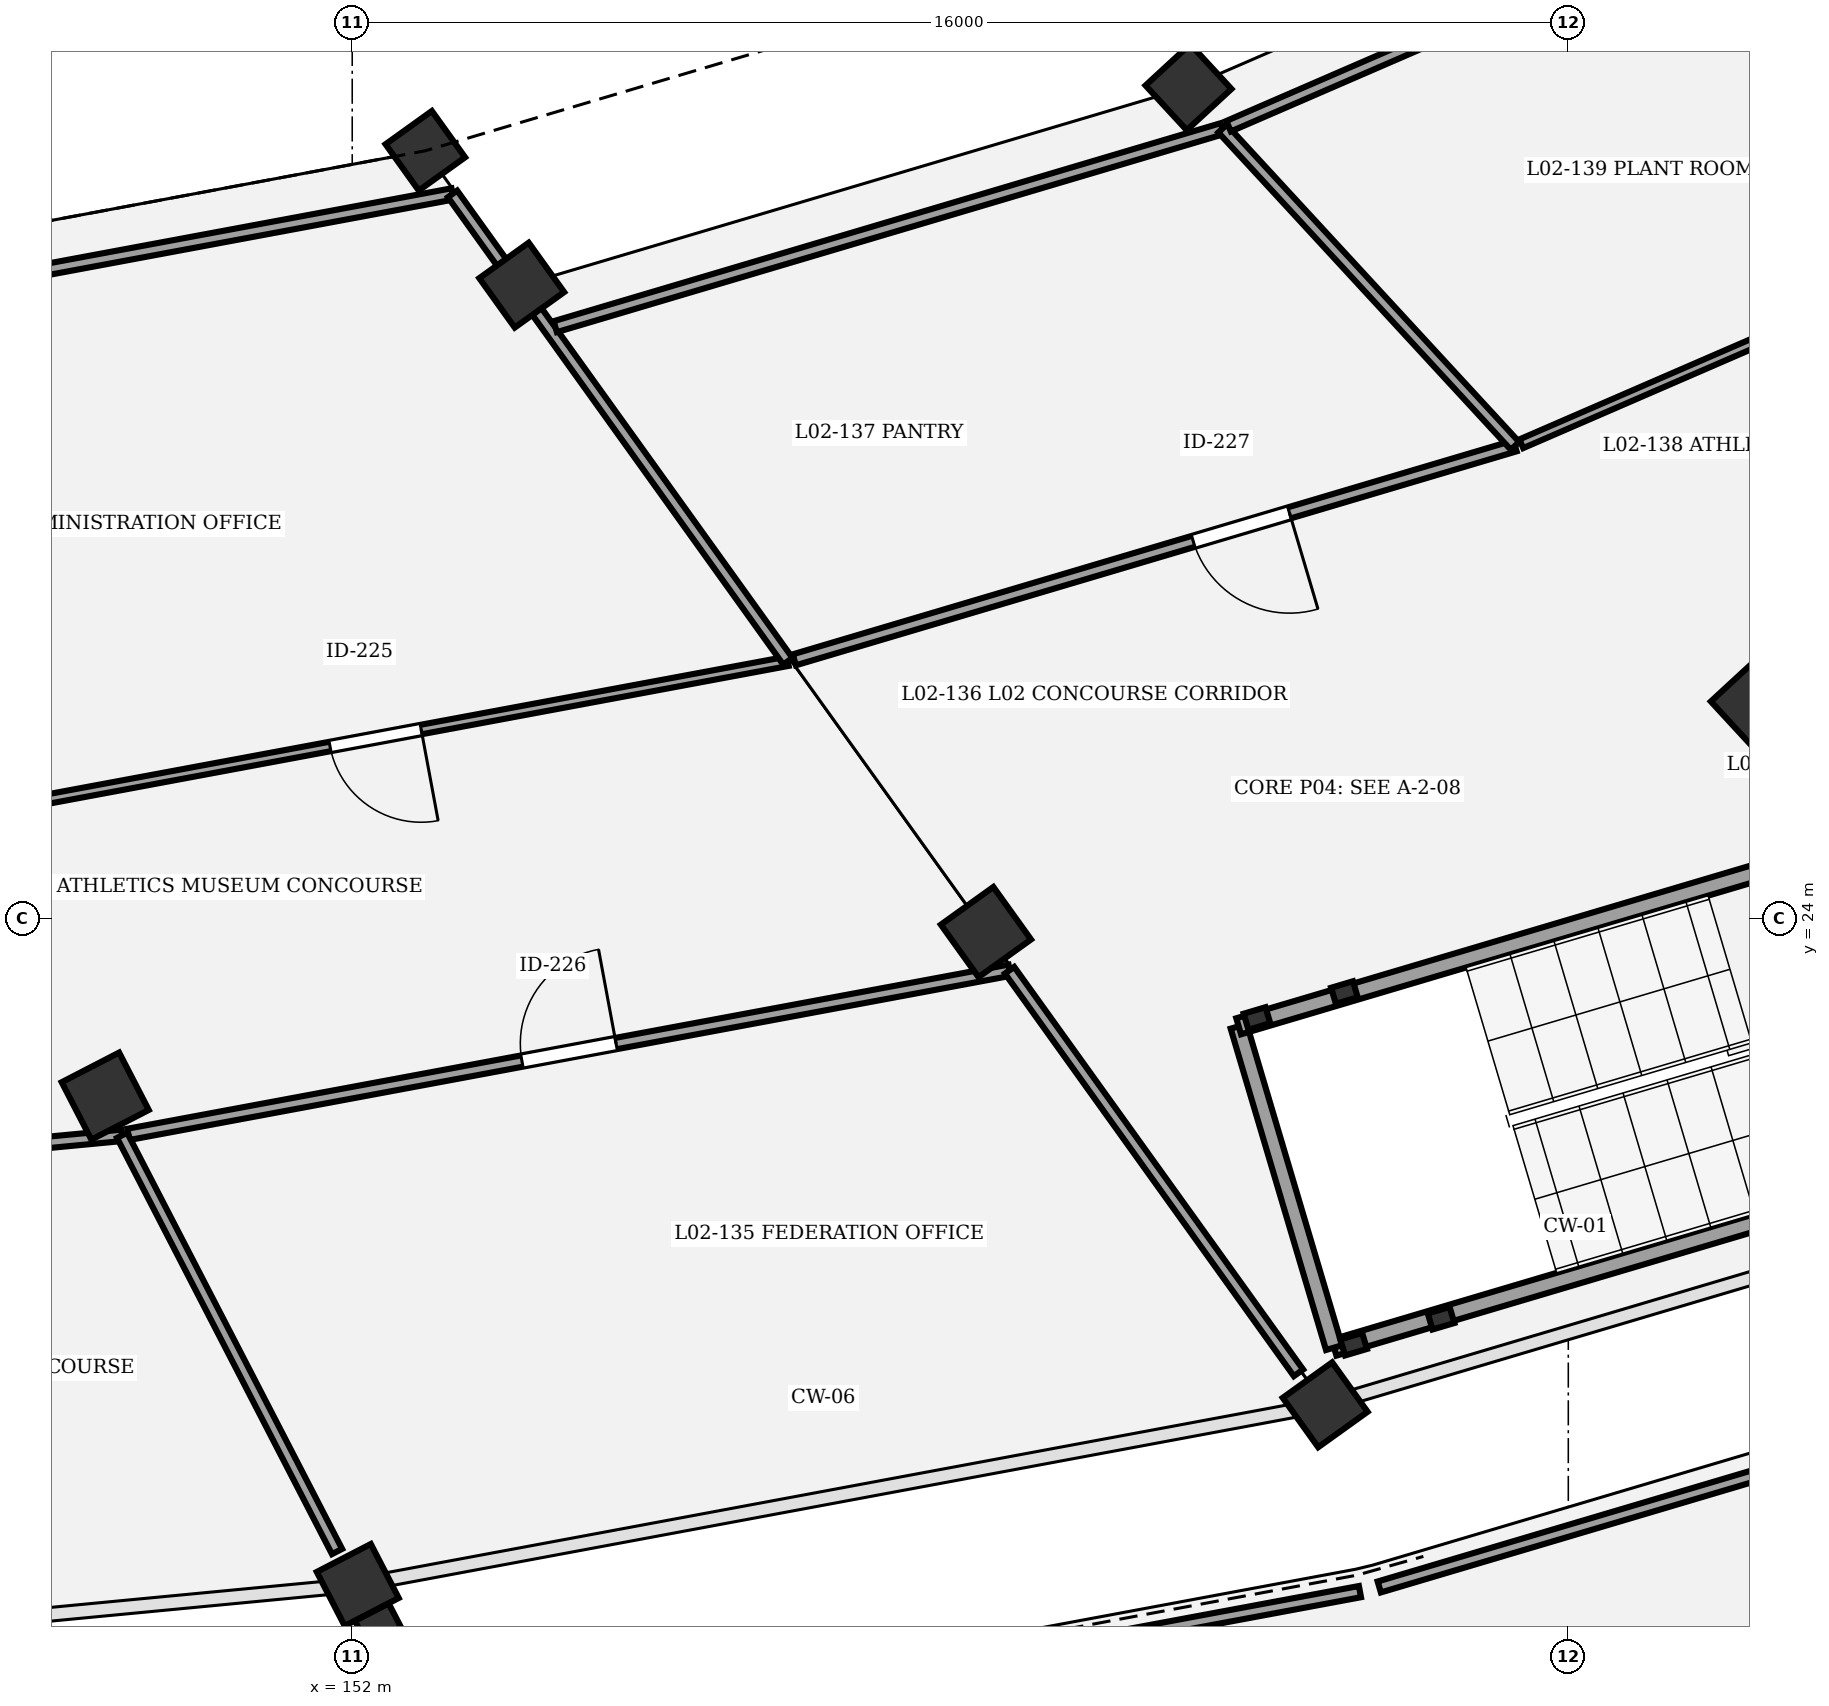
"""IFC4 building model, lengths in metres.
Left out: names, types, materials, properties, quantities, classifications, styles, units other than length and angle.
Written with IfcOpenShell. Run it as: python <this file> out.ifc"""

import sys

from ifc_helpers import new_model, si_unit, direction, frame, frame_2d, origin, origin_2d, place, context, subcontext, project, spatial, rectangle, extrude, element, fill, save


model = new_model("IFC4")
c1 = context("Model", 3, precision=1e-05, world=origin(), true_north=direction((0.0, 1.0)))
c2 = subcontext(c1, "Body", "Model", "MODEL_VIEW")
j1 = project(units=[si_unit("LENGTHUNIT", "METRE"), si_unit("PLANEANGLEUNIT", "RADIAN")], contexts=[c1])
p1 = place(None, origin())
s1 = spatial("IfcSite", under=j1, at=p1, CompositionType="ELEMENT")
p2 = place(p1, origin())
s2 = spatial("IfcBuilding", under=s1, at=p2, CompositionType="ELEMENT")
p3 = place(p2, frame((0.0, 0.0, 10.2)))
s3 = spatial("IfcBuildingStorey", under=s2, at=p3, CompositionType="ELEMENT", Elevation=10.2)
p4 = place(p3, frame((148.75, 21.665, 0.0), z_axis=(0.0, 0.0, 1.0), x_axis=(0.458959712465, -0.888457079624, 0.0)))
e1 = element("IfcColumn", 1, at=p4, inside=s3, PredefinedType="COLUMN", context=c2, shape_type="SweptSolid", body=[
    extrude(rectangle(XDim=0.85, YDim=0.85, at=origin_2d()), origin(), (0.0, 0.0, 1.0), 4.5),
])
p5 = place(p3, frame((152.073, 15.233, 0.0), z_axis=(0.0, 0.0, 1.0), x_axis=(0.458959712465, -0.888457079624, 0.0)))
e2 = element("IfcColumn", 2, at=p5, inside=s3, PredefinedType="COLUMN", context=c2, shape_type="SweptSolid", body=[
    extrude(rectangle(XDim=0.8, YDim=0.8, at=origin_2d()), origin(), (0.0, 0.0, 1.0), 4.5),
])
p6 = place(p3, frame((152.338, 14.719, 0.0), z_axis=(0.0, 0.0, 1.0), x_axis=(0.888457079624, 0.458959712465, 0.0)))
e3 = element("IfcColumn", 3, at=p6, inside=s3, PredefinedType="PILASTER", context=c2, shape_type="SweptSolid", body=[
    extrude(rectangle(XDim=0.5, YDim=0.35, at=origin_2d()), origin(), (0.0, 0.0, 1.0), 4.5),
])
p7 = place(p3, frame((152.962, 34.101, 0.0), z_axis=(0.0, 0.0, 1.0), x_axis=(0.582974127943, -0.812490717577, 0.0)))
e4 = element("IfcColumn", 4, at=p7, inside=s3, PredefinedType="COLUMN", context=c2, shape_type="SweptSolid", body=[
    extrude(rectangle(XDim=0.75, YDim=0.75, at=origin_2d()), origin(), (0.0, 0.0, 1.0), 4.5),
])
p8 = place(p3, frame((154.23, 32.333, 0.0), z_axis=(0.0, 0.0, 1.0), x_axis=(0.582974127943, -0.812490717577, 0.0)))
e5 = element("IfcColumn", 5, at=p8, inside=s3, PredefinedType="COLUMN", context=c2, shape_type="SweptSolid", body=[
    extrude(rectangle(XDim=0.8, YDim=0.8, at=origin_2d()), origin(), (0.0, 0.0, 1.0), 4.5),
])
p9 = place(p3, frame((160.338, 23.823, 0.0), z_axis=(0.0, 0.0, 1.0), x_axis=(0.582974127943, -0.812490717577, 0.0)))
e6 = element("IfcColumn", 6, at=p9, inside=s3, PredefinedType="COLUMN", context=c2, shape_type="SweptSolid", body=[
    extrude(rectangle(XDim=0.85, YDim=0.85, at=origin_2d()), origin(), (0.0, 0.0, 1.0), 4.5),
])
for number, where, z_axis, x_axis in (
    (7, (164.801, 17.603, 0.0), (0.0, 0.0, 1.0), (0.583, -0.812, 0.0)),
    (8, (163.003, 34.938, 0.0), (0.0, 0.0, 1.0), (0.678, -0.735, 0.0)),
):
    element("IfcColumn", number, at=place(p3, frame(where, z_axis=z_axis, x_axis=x_axis)), inside=s3, PredefinedType="COLUMN", context=c2, shape_type="SweptSolid", body=[
        extrude(rectangle(XDim=0.8, YDim=0.8, at=origin_2d()), origin(), (0.0, 0.0, 1.0), 4.5),
    ])
p10 = place(p3, frame((170.476, 26.832, 0.0), z_axis=(0.0, 0.0, 1.0), x_axis=(0.677903094969, -0.735151272753, 0.0)))
e9 = element("IfcColumn", 9, at=p10, inside=s3, PredefinedType="COLUMN", context=c2, shape_type="SweptSolid", body=[
    extrude(rectangle(XDim=0.85, YDim=0.85, at=origin_2d()), origin(), (0.0, 0.0, 1.0), 4.5),
])
for number, where, z_axis, x_axis in (
    (10, (165.054, 23.027, 0.0), (0.0, 0.0, 1.0), (-0.959, -0.285, 0.0)),
    (11, (163.904, 22.686, 0.0), (0.0, 0.0, 1.0), (-0.959, -0.285, 0.0)),
    (12, (165.176, 18.4, 0.0), (0.0, 0.0, 1.0), (-0.959, -0.285, 0.0)),
    (13, (166.326, 18.742, 0.0), (0.0, 0.0, 1.0), (-0.959, -0.285, 0.0)),
):
    element("IfcColumn", number, at=place(p3, frame(where, z_axis=z_axis, x_axis=x_axis)), inside=s3, PredefinedType="COLUMN", context=c2, shape_type="SweptSolid", body=[
        extrude(rectangle(XDim=0.3, YDim=0.22, at=origin_2d()), origin(), (0.0, 0.0, 1.0), 4.5),
    ])
p11 = place(p3, frame((173.105, 20.785, 0.0), z_axis=(0.0, 0.0, 1.0), x_axis=(-0.958675743706, -0.284500998997, 0.0)))
e14 = element("IfcWall", 14, at=p11, inside=s3, PredefinedType="SHEAR", context=c2, shape_type="SweptSolid", body=[
    extrude(rectangle(XDim=8.54, YDim=0.22, at=frame_2d((4.27, 0.0))), origin(), (0.0, 0.0, 1.0), 4.25),
])
p12 = place(p3, frame((163.663, 22.583, 0.0), z_axis=(0.0, 0.0, 1.0), x_axis=(0.284497328872, -0.958676832861, 0.0)))
e15 = element("IfcWall", 15, at=p12, inside=s3, PredefinedType="SHEAR", context=c2, shape_type="SweptSolid", body=[
    extrude(rectangle(XDim=4.41, YDim=0.22, at=frame_2d((2.205, 0.0))), origin(), (0.0, 0.0, 1.0), 4.25),
])
p13 = place(p3, frame((171.85, 25.013, 0.0), z_axis=(0.0, 0.0, 1.0), x_axis=(-0.95867342973, -0.284508796227, 0.0)))
e16 = element("IfcWall", 16, at=p13, inside=s3, PredefinedType="SHEAR", context=c2, shape_type="SweptSolid", body=[
    extrude(rectangle(XDim=8.54, YDim=0.22, at=frame_2d((4.27, 0.0))), origin(), (0.0, 0.0, 1.0), 4.25),
])
p14 = place(p13, frame((0.3, 0.0, 0.0)))
e17 = element("IfcOpeningElement", 17, at=p14, cuts=e16, PredefinedType="OPENING", context=c2, shape_type="SweptSolid", body=[
    extrude(rectangle(XDim=1.15, YDim=2.15, at=frame_2d((0.575, 1.075))), frame((0.0, 0.12, 0.0), z_axis=(0.0, -1.0, 0.0), x_axis=(1.0, 0.0, 0.0)), (0.0, 0.0, 1.0), 0.24),
])
p15 = place(p3, frame((135.681, 19.881, 0.0), z_axis=(0.0, 0.0, 1.0), x_axis=(0.995484535327, 0.094923863827, 0.0)))
e18 = element("IfcWall", 18, at=p15, inside=s3, PredefinedType="PARTITIONING", context=c2, shape_type="SweptSolid", body=[
    extrude(rectangle(XDim=13.351, YDim=0.15, at=frame_2d((6.676, 0.0))), origin(), (0.0, 0.0, 1.0), 3.25),
])
p16 = place(p15, frame((6.085, 0.0, 0.0)))
e19 = element("IfcOpeningElement", 19, at=p16, cuts=e18, PredefinedType="OPENING", context=c2, shape_type="SweptSolid", body=[
    extrude(rectangle(XDim=1.18, YDim=2.1, at=frame_2d((0.59, 1.05))), frame((0.0, 0.085, 0.0), z_axis=(0.0, -1.0, 0.0), x_axis=(1.0, 0.0, 0.0)), (0.0, 0.0, 1.0), 0.17),
])
p17 = place(p3, frame((157.732, 27.386, 0.0), z_axis=(0.0, 0.0, 1.0), x_axis=(-0.983097372707, -0.183083466695, 0.0)))
e20 = element("IfcWall", 20, at=p17, inside=s3, PredefinedType="PARTITIONING", context=c2, shape_type="SweptSolid", body=[
    extrude(rectangle(XDim=11.035, YDim=0.125, at=frame_2d((5.517, 0.0))), origin(), (0.0, 0.0, 1.0), 3.25),
])
p18 = place(p17, frame((4.907, 0.0, 0.0)))
e21 = element("IfcOpeningElement", 21, at=p18, cuts=e20, PredefinedType="OPENING", context=c2, shape_type="SweptSolid", body=[
    extrude(rectangle(XDim=1.22, YDim=2.1, at=frame_2d((0.61, 1.05))), frame((0.0, 0.073, 0.0), z_axis=(0.0, -1.0, 0.0), x_axis=(1.0, 0.0, 0.0)), (0.0, 0.0, 1.0), 0.145),
])
p19 = place(p3, frame((149.055, 21.161, 0.0), z_axis=(0.0, 0.0, 1.0), x_axis=(0.983095748229, 0.183092189385, 0.0)))
e22 = element("IfcWall", 22, at=p19, inside=s3, PredefinedType="PARTITIONING", context=c2, shape_type="SweptSolid", body=[
    extrude(rectangle(XDim=11.793, YDim=0.15, at=frame_2d((5.896, 0.0))), origin(), (0.0, 0.0, 1.0), 3.25),
])
p20 = place(p19, frame((5.267, 0.0, 0.0)))
e23 = element("IfcOpeningElement", 23, at=p20, cuts=e22, PredefinedType="OPENING", context=c2, shape_type="SweptSolid", body=[
    extrude(rectangle(XDim=1.26, YDim=2.1, at=frame_2d((0.63, 1.05))), frame((0.0, 0.085, 0.0), z_axis=(0.0, -1.0, 0.0), x_axis=(1.0, 0.0, 0.0)), (0.0, 0.0, 1.0), 0.17),
])
p21 = place(p3, frame((167.299, 30.219, 0.0), z_axis=(0.0, 0.0, 1.0), x_axis=(-0.958655809656, -0.284568161629, 0.0)))
e24 = element("IfcWall", 24, at=p21, inside=s3, PredefinedType="PARTITIONING", context=c2, shape_type="SweptSolid", body=[
    extrude(rectangle(XDim=9.891, YDim=0.15, at=frame_2d((4.946, 0.0))), origin(), (0.0, 0.0, 1.0), 3.25),
])
p22 = place(p21, frame((3.096, 0.0, 0.0)))
e25 = element("IfcOpeningElement", 25, at=p22, cuts=e24, PredefinedType="OPENING", context=c2, shape_type="SweptSolid", body=[
    extrude(rectangle(XDim=1.32, YDim=2.1, at=frame_2d((0.66, 1.05))), frame((0.0, 0.085, 0.0), z_axis=(0.0, -1.0, 0.0), x_axis=(1.0, 0.0, 0.0)), (0.0, 0.0, 1.0), 0.17),
])
p23 = place(p3, frame((175.685, 33.846, 0.0), z_axis=(0.0, 0.0, 1.0), x_axis=(-0.917494590455, -0.397748257677, 0.0)))
e26 = element("IfcWall", 26, at=p23, inside=s3, PredefinedType="PARTITIONING", context=c2, shape_type="SweptSolid", body=[
    extrude(rectangle(XDim=9.049, YDim=0.125, at=frame_2d((4.525, 0.0))), origin(), (0.0, 0.0, 1.0), 3.25),
])
p24 = place(p23, frame((1.722, 0.0, 0.0)))
e27 = element("IfcOpeningElement", 27, at=p24, cuts=e26, PredefinedType="OPENING", context=c2, shape_type="SweptSolid", body=[
    extrude(rectangle(XDim=1.4, YDim=2.1, at=frame_2d((0.7, 1.05))), frame((0.0, 0.073, 0.0), z_axis=(0.0, -1.0, 0.0), x_axis=(1.0, 0.0, 0.0)), (0.0, 0.0, 1.0), 0.145),
])
p25 = place(p3, frame((148.972, 21.148, 0.0), z_axis=(0.0, 0.0, 1.0), x_axis=(0.45896480759, -0.888454447563, 0.0)))
e28 = element("IfcWall", 28, at=p25, inside=s3, PredefinedType="PARTITIONING", context=c2, shape_type="SweptSolid", body=[
    extrude(rectangle(XDim=6.163, YDim=0.15, at=frame_2d((3.081, 0.0))), origin(), (0.0, 0.0, 1.0), 3.25),
])
p26 = place(p3, frame((143.599, 31.723, 0.0), z_axis=(0.0, 0.0, 1.0), x_axis=(0.98309647403, 0.183088292225, 0.0)))
e29 = element("IfcWall", 29, at=p26, inside=s3, PredefinedType="PARTITIONING", context=c2, shape_type="SweptSolid", body=[
    extrude(rectangle(XDim=9.888, YDim=0.15, at=frame_2d((4.944, 0.0))), origin(), (0.0, 0.0, 1.0), 3.25),
])
p27 = place(p3, frame((153.32, 33.533, 0.0), z_axis=(0.0, 0.0, 1.0), x_axis=(0.583043547447, -0.812440903562, 0.0)))
e30 = element("IfcWall", 30, at=p27, inside=s3, PredefinedType="PARTITIONING", context=c2, shape_type="SweptSolid", body=[
    extrude(rectangle(XDim=7.567, YDim=0.15, at=frame_2d((3.783, 0.0))), origin(), (0.0, 0.0, 1.0), 3.25),
])
p28 = place(p3, frame((160.649, 23.32, 0.0), z_axis=(0.0, 0.0, 1.0), x_axis=(0.58306104439, -0.812428346696, 0.0)))
e31 = element("IfcWall", 31, at=p28, inside=s3, PredefinedType="PARTITIONING", context=c2, shape_type="SweptSolid", body=[
    extrude(rectangle(XDim=6.52, YDim=0.15, at=frame_2d((3.26, 0.0))), origin(), (0.0, 0.0, 1.0), 3.25),
])
p29 = place(p3, frame((154.671, 31.788, 0.0), z_axis=(0.0, 0.0, 1.0), x_axis=(0.958661639872, 0.284548520005, 0.0)))
e32 = element("IfcWall", 32, at=p29, inside=s3, PredefinedType="PARTITIONING", context=c2, shape_type="SweptSolid", body=[
    extrude(rectangle(XDim=9.157, YDim=0.15, at=frame_2d((4.579, 0.0))), origin(), (0.0, 0.0, 1.0), 3.25),
])
p30 = place(p3, frame((163.45, 34.393, 0.0), z_axis=(0.0, 0.0, 1.0), x_axis=(0.677844218495, -0.735205559999, 0.0)))
e33 = element("IfcWall", 33, at=p30, inside=s3, PredefinedType="PARTITIONING", context=c2, shape_type="SweptSolid", body=[
    extrude(rectangle(XDim=5.678, YDim=0.15, at=frame_2d((2.839, 0.0))), origin(), (0.0, 0.0, 1.0), 3.25),
])
p31 = place(p3, frame((163.53, 34.424, 0.0), z_axis=(0.0, 0.0, 1.0), x_axis=(0.917493946853, 0.397749742286, 0.0)))
e34 = element("IfcWall", 34, at=p31, inside=s3, PredefinedType="PARTITIONING", context=c2, shape_type="SweptSolid", body=[
    extrude(rectangle(XDim=8.377, YDim=0.15, at=frame_2d((4.188, 0.0))), origin(), (0.0, 0.0, 1.0), 3.25),
])
p32 = place(p3, frame((165.513, 15.207, 0.0), z_axis=(0.0, 0.0, 1.0), x_axis=(0.95866000112, 0.284554041006, 0.0)))
e35 = element("IfcWall", 35, at=p32, inside=s3, PredefinedType="PARTITIONING", context=c2, shape_type="SweptSolid", body=[
    extrude(rectangle(XDim=8.478, YDim=0.15, at=frame_2d((4.239, 0.0))), origin(), (0.0, 0.0, 1.0), 3.25),
])
p33 = place(p3, frame((155.924, 13.407, 0.0), z_axis=(0.0, 0.0, 1.0), x_axis=(0.983095301178, 0.183094589766, 0.0)))
e36 = element("IfcWall", 36, at=p33, inside=s3, PredefinedType="PARTITIONING", context=c2, shape_type="SweptSolid", body=[
    extrude(rectangle(XDim=9.495, YDim=0.15, at=frame_2d((4.748, 0.0))), origin(), (0.0, 0.0, 1.0), 3.25),
])
p34 = place(p18, origin())
e37 = element("IfcDoor", 37, at=p34, inside=s3, OperationType="SINGLE_SWING_LEFT", PredefinedType="DOOR", context=c2, shape_type="SweptSolid", body=[
    extrude(rectangle(XDim=1.22, YDim=2.1, at=frame_2d((0.61, 1.05))), frame((0.0, 0.025, 0.0), z_axis=(0.0, -1.0, 0.0), x_axis=(1.0, 0.0, 0.0)), (0.0, 0.0, 1.0), 0.05),
])
fill(e21, e37)
p35 = place(p20, origin())
e38 = element("IfcDoor", 38, at=p35, inside=s3, OperationType="SINGLE_SWING_RIGHT", PredefinedType="DOOR", context=c2, shape_type="SweptSolid", body=[
    extrude(rectangle(XDim=1.26, YDim=2.1, at=frame_2d((0.63, 1.05))), frame((0.0, 0.025, 0.0), z_axis=(0.0, -1.0, 0.0), x_axis=(1.0, 0.0, 0.0)), (0.0, 0.0, 1.0), 0.05),
])
fill(e23, e38)
p36 = place(p22, origin())
e39 = element("IfcDoor", 39, at=p36, inside=s3, OperationType="SINGLE_SWING_LEFT", PredefinedType="DOOR", context=c2, shape_type="SweptSolid", body=[
    extrude(rectangle(XDim=1.32, YDim=2.1, at=frame_2d((0.66, 1.05))), frame((0.0, 0.025, 0.0), z_axis=(0.0, -1.0, 0.0), x_axis=(1.0, 0.0, 0.0)), (0.0, 0.0, 1.0), 0.05),
])
fill(e25, e39)
save(model, sys.argv[1])
